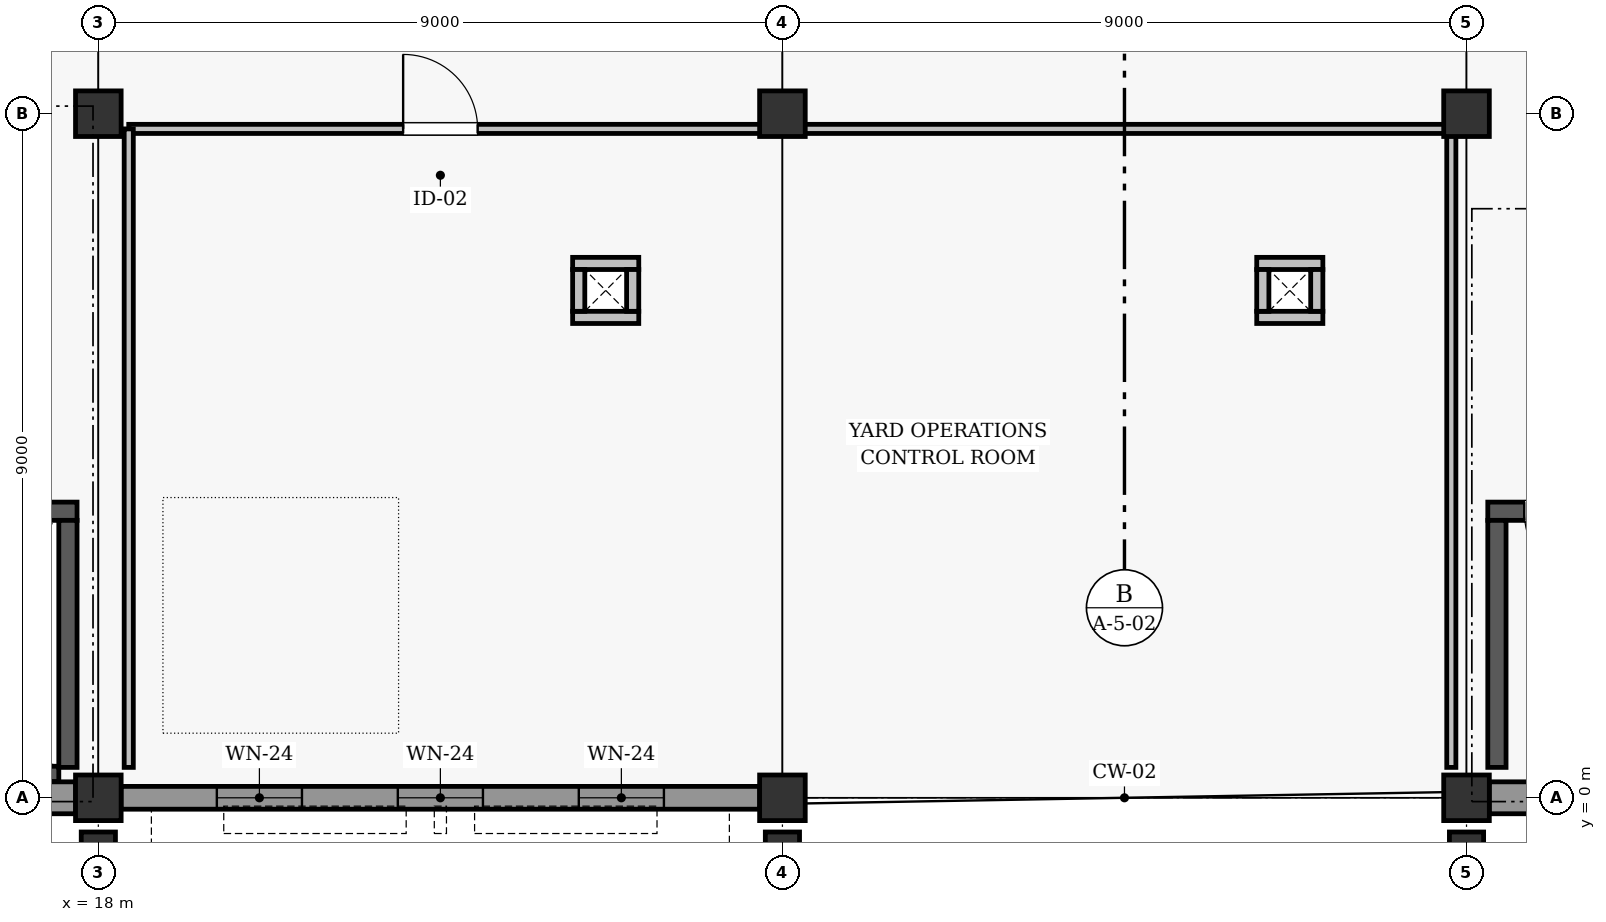
"""IFC4 building model, lengths in metres.
Left out: names, types, materials, properties, quantities, classifications, styles, units other than length and angle.
Written with IfcOpenShell. Run it as: python <this file> out.ifc"""

import sys

from ifc_helpers import new_model, si_unit, direction, frame, frame_2d, origin, origin_2d, place, context, subcontext, project, spatial, rectangle, extrude, element, fill, save


model = new_model("IFC4")
c1 = context("Model", 3, precision=1e-05, world=origin(), true_north=direction((0.0, 1.0)))
c2 = subcontext(c1, "Body", "Model", "MODEL_VIEW")
j1 = project(units=[si_unit("LENGTHUNIT", "METRE"), si_unit("PLANEANGLEUNIT", "RADIAN")], contexts=[c1])
p1 = place(None, origin())
s1 = spatial("IfcSite", under=j1, at=p1, CompositionType="ELEMENT")
p2 = place(p1, origin())
s2 = spatial("IfcBuilding", under=s1, at=p2, CompositionType="ELEMENT")
p3 = place(p2, frame((0.0, 0.0, 8.4)))
s3 = spatial("IfcBuildingStorey", under=s2, at=p3, CompositionType="ELEMENT", Elevation=8.4)
for number, where, z_axis, x_axis in (
    (1, (18.0, 0.0, 0.0), (0.0, 0.0, 1.0), (1.0, 0.0, 0.0)),
    (2, (18.0, 9.0, 0.0), (0.0, 0.0, 1.0), (1.0, 0.0, 0.0)),
    (3, (27.0, 0.0, 0.0), (0.0, 0.0, 1.0), (1.0, 0.0, 0.0)),
    (4, (27.0, 9.0, 0.0), (0.0, 0.0, 1.0), (1.0, 0.0, 0.0)),
    (5, (36.0, 0.0, 0.0), (0.0, 0.0, 1.0), (1.0, 0.0, 0.0)),
    (6, (36.0, 9.0, 0.0), (0.0, 0.0, 1.0), (1.0, 0.0, 0.0)),
):
    element("IfcColumn", number, at=place(p3, frame(where, z_axis=z_axis, x_axis=x_axis)), inside=s3, PredefinedType="COLUMN", context=c2, shape_type="SweptSolid", body=[
        extrude(rectangle(XDim=0.6, YDim=0.6, at=origin_2d()), origin(), (0.0, 0.0, 1.0), 3.6),
    ])
for number, where, z_axis, x_axis in (
    (7, (18.0, -0.75, 0.0), (0.0, 0.0, 1.0), (1.0, 0.0, 0.0)),
    (8, (27.0, -0.75, 0.0), (0.0, 0.0, 1.0), (1.0, 0.0, 0.0)),
    (9, (36.0, -0.75, 0.0), (0.0, 0.0, 1.0), (1.0, 0.0, 0.0)),
):
    element("IfcColumn", number, at=place(p3, frame(where, z_axis=z_axis, x_axis=x_axis)), inside=s3, PredefinedType="PILASTER", context=c2, shape_type="SweptSolid", body=[
        extrude(rectangle(XDim=0.45, YDim=0.6, at=origin_2d()), origin(), (0.0, 0.0, 1.0), 3.6),
    ])
p4 = place(p3, frame((9.298, 0.0, 0.0), z_axis=(0.0, 0.0, 1.0), x_axis=(1.0, 0.0, 0.0)))
e10 = element("IfcWall", 10, at=p4, inside=s3, PredefinedType="SOLIDWALL", context=c2, shape_type="SweptSolid", body=[
    extrude(rectangle(XDim=8.404, YDim=0.42, at=frame_2d((4.202, 0.0))), origin(), (0.0, 0.0, 1.0), 2.862),
])
p5 = place(p3, frame((18.298, 0.0, 0.0), z_axis=(0.0, 0.0, 1.0), x_axis=(1.0, 0.0, 0.0)))
e11 = element("IfcWall", 11, at=p5, inside=s3, PredefinedType="SOLIDWALL", context=c2, shape_type="SweptSolid", body=[
    extrude(rectangle(XDim=8.404, YDim=0.3, at=frame_2d((4.202, 0.0))), origin(), (0.0, 0.0, 1.0), 2.862),
])
p6 = place(p5, frame((1.261, 0.0, 0.8)))
e12 = element("IfcOpeningElement", 12, at=p6, cuts=e11, PredefinedType="OPENING", context=c2, shape_type="SweptSolid", body=[
    extrude(rectangle(XDim=1.12, YDim=1.08, at=frame_2d((0.56, 0.54))), frame((0.0, 0.16, 0.0), z_axis=(0.0, -1.0, 0.0), x_axis=(1.0, 0.0, 0.0)), (0.0, 0.0, 1.0), 0.32),
])
p7 = place(p5, frame((3.642, 0.0, 0.8)))
e13 = element("IfcOpeningElement", 13, at=p7, cuts=e11, PredefinedType="OPENING", context=c2, shape_type="SweptSolid", body=[
    extrude(rectangle(XDim=1.12, YDim=1.08, at=frame_2d((0.56, 0.54))), frame((0.0, 0.16, 0.0), z_axis=(0.0, -1.0, 0.0), x_axis=(1.0, 0.0, 0.0)), (0.0, 0.0, 1.0), 0.32),
])
p8 = place(p5, frame((6.023, 0.0, 0.8)))
e14 = element("IfcOpeningElement", 14, at=p8, cuts=e11, PredefinedType="OPENING", context=c2, shape_type="SweptSolid", body=[
    extrude(rectangle(XDim=1.12, YDim=1.08, at=frame_2d((0.56, 0.54))), frame((0.0, 0.16, 0.0), z_axis=(0.0, -1.0, 0.0), x_axis=(1.0, 0.0, 0.0)), (0.0, 0.0, 1.0), 0.32),
])
p9 = place(p3, frame((36.298, 0.0, 0.0), z_axis=(0.0, 0.0, 1.0), x_axis=(1.0, 0.0, 0.0)))
e15 = element("IfcWall", 15, at=p9, inside=s3, PredefinedType="SOLIDWALL", context=c2, shape_type="SweptSolid", body=[
    extrude(rectangle(XDim=8.404, YDim=0.42, at=frame_2d((4.202, 0.0))), origin(), (0.0, 0.0, 1.0), 2.862),
])
p10 = place(p3, frame((11.07, 0.315, 0.0), z_axis=(0.0, 0.0, 1.0), x_axis=(1.0, 0.0, 0.0)))
e16 = element("IfcWall", 16, at=p10, inside=s3, PredefinedType="SHEAR", context=c2, shape_type="SweptSolid", body=[
    extrude(rectangle(XDim=6.41, YDim=0.2, at=frame_2d((3.205, 0.0))), origin(), (0.0, 0.0, 1.0), 3.35),
])
p11 = place(p3, frame((9.28, 3.77, 0.0), z_axis=(0.0, 0.0, 1.0), x_axis=(1.0, 0.0, 0.0)))
e17 = element("IfcWall", 17, at=p11, inside=s3, PredefinedType="SHEAR", context=c2, shape_type="SweptSolid", body=[
    extrude(rectangle(XDim=8.44, YDim=0.24, at=frame_2d((4.22, 0.0))), origin(), (0.0, 0.0, 1.0), 3.35),
])
p12 = place(p11, frame((0.48, 0.0, 0.0)))
e18 = element("IfcOpeningElement", 18, at=p12, cuts=e17, PredefinedType="OPENING", context=c2, shape_type="SweptSolid", body=[
    extrude(rectangle(XDim=1.08, YDim=2.08, at=frame_2d((0.54, 1.04))), frame((0.0, 0.13, 0.0), z_axis=(0.0, -1.0, 0.0), x_axis=(1.0, 0.0, 0.0)), (0.0, 0.0, 1.0), 0.26),
])
p13 = place(p3, frame((17.6, 0.4, 0.0), z_axis=(0.0, 0.0, 1.0), x_axis=(0.0, 1.0, 0.0)))
e19 = element("IfcWall", 19, at=p13, inside=s3, PredefinedType="SHEAR", context=c2, shape_type="SweptSolid", body=[
    extrude(rectangle(XDim=3.25, YDim=0.24, at=frame_2d((1.625, 0.0))), origin(), (0.0, 0.0, 1.0), 3.35),
])
p14 = place(p3, frame((36.28, 3.77, 0.0), z_axis=(0.0, 0.0, 1.0), x_axis=(1.0, 0.0, 0.0)))
e20 = element("IfcWall", 20, at=p14, inside=s3, PredefinedType="SHEAR", context=c2, shape_type="SweptSolid", body=[
    extrude(rectangle(XDim=8.44, YDim=0.24, at=frame_2d((4.22, 0.0))), origin(), (0.0, 0.0, 1.0), 3.35),
])
p15 = place(p14, frame((0.48, 0.0, 0.0)))
e21 = element("IfcOpeningElement", 21, at=p15, cuts=e20, PredefinedType="OPENING", context=c2, shape_type="SweptSolid", body=[
    extrude(rectangle(XDim=1.08, YDim=2.08, at=frame_2d((0.54, 1.04))), frame((0.0, 0.13, 0.0), z_axis=(0.0, -1.0, 0.0), x_axis=(1.0, 0.0, 0.0)), (0.0, 0.0, 1.0), 0.26),
])
p16 = place(p3, frame((36.4, 0.4, 0.0), z_axis=(0.0, 0.0, 1.0), x_axis=(0.0, 1.0, 0.0)))
e22 = element("IfcWall", 22, at=p16, inside=s3, PredefinedType="SHEAR", context=c2, shape_type="SweptSolid", body=[
    extrude(rectangle(XDim=3.25, YDim=0.24, at=frame_2d((1.625, 0.0))), origin(), (0.0, 0.0, 1.0), 3.35),
])
for number, where, z_axis, x_axis in (
    (23, (24.24, 6.32, 0.0), (0.0, 0.0, 1.0), (1.0, 0.0, 0.0)),
    (24, (24.24, 7.03, 0.0), (0.0, 0.0, 1.0), (1.0, 0.0, 0.0)),
):
    element("IfcWall", number, at=place(p3, frame(where, z_axis=z_axis, x_axis=x_axis)), inside=s3, PredefinedType="PARTITIONING", context=c2, shape_type="SweptSolid", body=[
        extrude(rectangle(XDim=0.87, YDim=0.16, at=frame_2d((0.435, 0.0))), origin(), (0.0, 0.0, 1.0), 3.35),
    ])
for number, where, z_axis, x_axis in (
    (25, (24.32, 6.4, 0.0), (0.0, 0.0, 1.0), (0.0, 1.0, 0.0)),
    (26, (25.03, 6.4, 0.0), (0.0, 0.0, 1.0), (0.0, 1.0, 0.0)),
):
    element("IfcWall", number, at=place(p3, frame(where, z_axis=z_axis, x_axis=x_axis)), inside=s3, PredefinedType="PARTITIONING", context=c2, shape_type="SweptSolid", body=[
        extrude(rectangle(XDim=0.55, YDim=0.16, at=frame_2d((0.275, 0.0))), origin(), (0.0, 0.0, 1.0), 3.35),
    ])
for number, where, z_axis, x_axis in (
    (27, (33.24, 6.32, 0.0), (0.0, 0.0, 1.0), (1.0, 0.0, 0.0)),
    (28, (33.24, 7.03, 0.0), (0.0, 0.0, 1.0), (1.0, 0.0, 0.0)),
):
    element("IfcWall", number, at=place(p3, frame(where, z_axis=z_axis, x_axis=x_axis)), inside=s3, PredefinedType="PARTITIONING", context=c2, shape_type="SweptSolid", body=[
        extrude(rectangle(XDim=0.87, YDim=0.16, at=frame_2d((0.435, 0.0))), origin(), (0.0, 0.0, 1.0), 3.35),
    ])
for number, where, z_axis, x_axis in (
    (29, (33.32, 6.4, 0.0), (0.0, 0.0, 1.0), (0.0, 1.0, 0.0)),
    (30, (34.03, 6.4, 0.0), (0.0, 0.0, 1.0), (0.0, 1.0, 0.0)),
):
    element("IfcWall", number, at=place(p3, frame(where, z_axis=z_axis, x_axis=x_axis)), inside=s3, PredefinedType="PARTITIONING", context=c2, shape_type="SweptSolid", body=[
        extrude(rectangle(XDim=0.55, YDim=0.16, at=frame_2d((0.275, 0.0))), origin(), (0.0, 0.0, 1.0), 3.35),
    ])
p17 = place(p3, frame((18.4, 8.8, 0.0), z_axis=(0.0, 0.0, 1.0), x_axis=(1.0, 0.0, 0.0)))
e31 = element("IfcWall", 31, at=p17, inside=s3, PredefinedType="PARTITIONING", context=c2, shape_type="SweptSolid", body=[
    extrude(rectangle(XDim=17.4, YDim=0.12, at=frame_2d((8.7, 0.0))), origin(), (0.0, 0.0, 1.0), 2.845),
])
p18 = place(p17, frame((3.61, 0.0, 0.0)))
e32 = element("IfcOpeningElement", 32, at=p18, cuts=e31, PredefinedType="OPENING", context=c2, shape_type="SweptSolid", body=[
    extrude(rectangle(XDim=0.98, YDim=2.08, at=frame_2d((0.49, 1.04))), frame((0.0, 0.07, 0.0), z_axis=(0.0, -1.0, 0.0), x_axis=(1.0, 0.0, 0.0)), (0.0, 0.0, 1.0), 0.14),
])
for number, where, z_axis, x_axis in (
    (33, (18.4, 0.4, 0.0), (0.0, 0.0, 1.0), (0.0, 1.0, 0.0)),
    (34, (35.8, 0.4, 0.0), (0.0, 0.0, 1.0), (0.0, 1.0, 0.0)),
):
    element("IfcWall", number, at=place(p3, frame(where, z_axis=z_axis, x_axis=x_axis)), inside=s3, PredefinedType="PARTITIONING", context=c2, shape_type="SweptSolid", body=[
        extrude(rectangle(XDim=8.4, YDim=0.12, at=frame_2d((4.2, 0.0))), origin(), (0.0, 0.0, 1.0), 2.845),
    ])
p19 = place(p6, origin())
e35 = element("IfcWindow", 35, at=p19, inside=s3, PartitioningType="SINGLE_PANEL", PredefinedType="WINDOW", context=c2, shape_type="SweptSolid", body=[
    extrude(rectangle(XDim=1.12, YDim=1.08, at=frame_2d((0.56, 0.54))), frame((0.0, 0.03, 0.0), z_axis=(0.0, -1.0, 0.0), x_axis=(1.0, 0.0, 0.0)), (0.0, 0.0, 1.0), 0.06),
])
fill(e12, e35)
p20 = place(p7, origin())
e36 = element("IfcWindow", 36, at=p20, inside=s3, PartitioningType="SINGLE_PANEL", PredefinedType="WINDOW", context=c2, shape_type="SweptSolid", body=[
    extrude(rectangle(XDim=1.12, YDim=1.08, at=frame_2d((0.56, 0.54))), frame((0.0, 0.03, 0.0), z_axis=(0.0, -1.0, 0.0), x_axis=(1.0, 0.0, 0.0)), (0.0, 0.0, 1.0), 0.06),
])
fill(e13, e36)
p21 = place(p8, origin())
e37 = element("IfcWindow", 37, at=p21, inside=s3, PartitioningType="SINGLE_PANEL", PredefinedType="WINDOW", context=c2, shape_type="SweptSolid", body=[
    extrude(rectangle(XDim=1.12, YDim=1.08, at=frame_2d((0.56, 0.54))), frame((0.0, 0.03, 0.0), z_axis=(0.0, -1.0, 0.0), x_axis=(1.0, 0.0, 0.0)), (0.0, 0.0, 1.0), 0.06),
])
fill(e14, e37)
p22 = place(p15, frame((1.08, 0.0, 0.0), z_axis=(0.0, 0.0, 1.0), x_axis=(-1.0, 0.0, 0.0)))
e38 = element("IfcDoor", 38, at=p22, inside=s3, OperationType="SINGLE_SWING_RIGHT", PredefinedType="DOOR", context=c2, shape_type="SweptSolid", body=[
    extrude(rectangle(XDim=1.08, YDim=2.08, at=frame_2d((0.54, 1.04))), frame((0.0, 0.025, 0.0), z_axis=(0.0, -1.0, 0.0), x_axis=(1.0, 0.0, 0.0)), (0.0, 0.0, 1.0), 0.05),
])
fill(e21, e38)
p23 = place(p18, origin())
e39 = element("IfcDoor", 39, at=p23, inside=s3, OperationType="SINGLE_SWING_LEFT", PredefinedType="DOOR", context=c2, shape_type="SweptSolid", body=[
    extrude(rectangle(XDim=0.98, YDim=2.08, at=frame_2d((0.49, 1.04))), frame((0.0, 0.025, 0.0), z_axis=(0.0, -1.0, 0.0), x_axis=(1.0, 0.0, 0.0)), (0.0, 0.0, 1.0), 0.05),
])
fill(e32, e39)
save(model, sys.argv[1])
